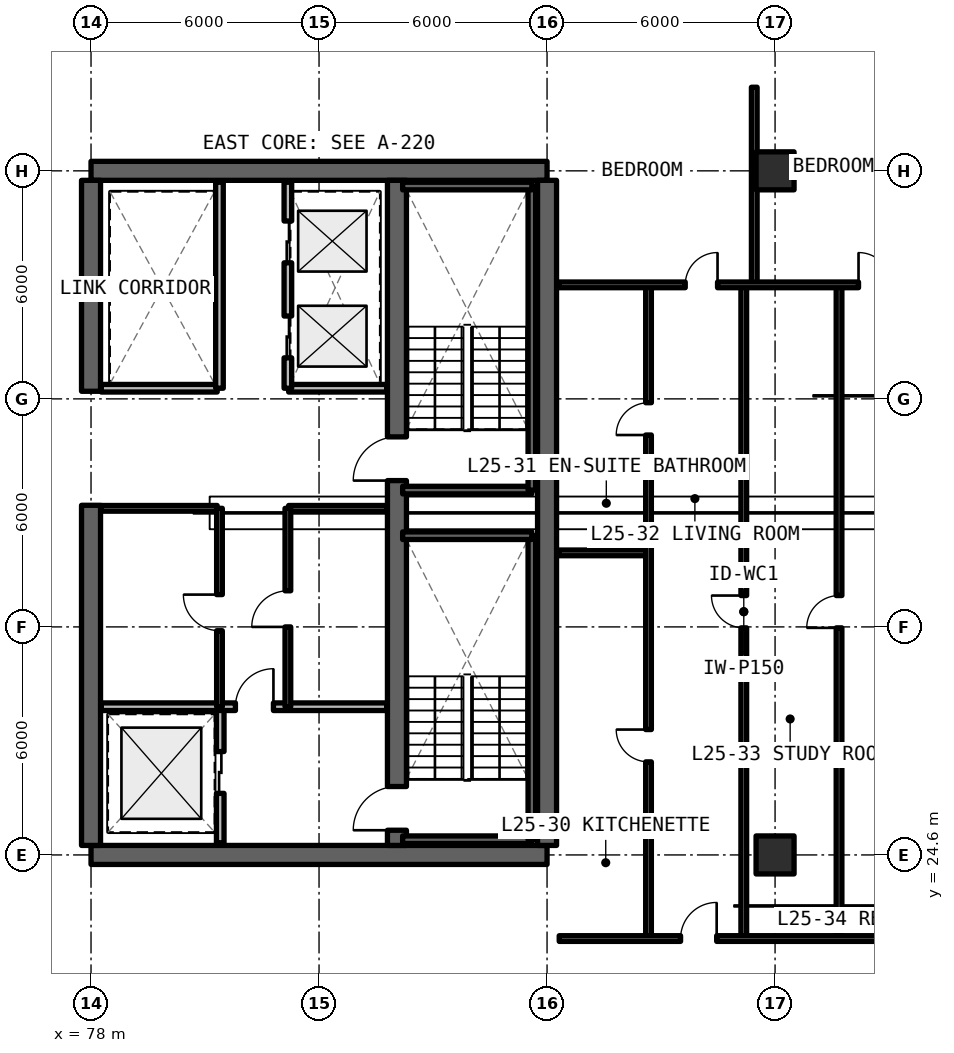
"""IFC4 building model, lengths in metres.
Left out: names, types, materials, properties, quantities, classifications, styles, units other than length and angle.
Written with IfcOpenShell. Run it as: python <this file> out.ifc"""

import sys

from ifc_helpers import new_model, si_unit, direction, frame, frame_2d, origin, origin_2d, place, context, subcontext, project, spatial, rectangle, extrude, element, fill, save


model = new_model("IFC4")
c1 = context("Model", 3, precision=1e-05, world=origin(), true_north=direction((0.0, 1.0)))
c2 = subcontext(c1, "Body", "Model", "MODEL_VIEW")
j1 = project(units=[si_unit("LENGTHUNIT", "METRE"), si_unit("PLANEANGLEUNIT", "RADIAN")], contexts=[c1])
p1 = place(None, origin())
s1 = spatial("IfcSite", under=j1, at=p1, CompositionType="ELEMENT")
p2 = place(p1, origin())
s2 = spatial("IfcBuilding", under=s1, at=p2, CompositionType="ELEMENT")
p3 = place(p2, frame((0.0, 0.0, 92.07)))
s3 = spatial("IfcBuildingStorey", under=s2, at=p3, CompositionType="ELEMENT", Elevation=92.07)
for number, where, z_axis, x_axis in (
    (1, (78.0, 24.6, 0.0), (0.0, 0.0, 1.0), (1.0, 0.0, 0.0)),
    (2, (90.0, 42.6, 0.0), (0.0, 0.0, 1.0), (-1.0, 0.0, 0.0)),
):
    element("IfcWall", number, at=place(p3, frame(where, z_axis=z_axis, x_axis=x_axis)), inside=s3, PredefinedType="SHEAR", context=c2, shape_type="SweptSolid", body=[
        extrude(rectangle(XDim=12.0, YDim=0.5, at=frame_2d((6.0, 0.0))), origin(), (0.0, 0.0, 1.0), 3.3),
    ])
p4 = place(p3, frame((90.0, 24.85, 0.0), z_axis=(0.0, 0.0, 1.0), x_axis=(0.0, 1.0, 0.0)))
e3 = element("IfcWall", 3, at=p4, inside=s3, PredefinedType="SHEAR", context=c2, shape_type="SweptSolid", body=[
    extrude(rectangle(XDim=17.5, YDim=0.5, at=frame_2d((8.75, 0.0))), origin(), (0.0, 0.0, 1.0), 3.3),
])
p5 = place(p3, frame((78.0, 24.85, 0.0), z_axis=(0.0, 0.0, 1.0), x_axis=(0.0, 1.0, 0.0)))
e4 = element("IfcWall", 4, at=p5, inside=s3, PredefinedType="SHEAR", context=c2, shape_type="SweptSolid", body=[
    extrude(rectangle(XDim=8.95, YDim=0.5, at=frame_2d((4.475, 0.0))), origin(), (0.0, 0.0, 1.0), 3.3),
])
p6 = place(p3, frame((78.0, 36.8, 0.0), z_axis=(0.0, 0.0, 1.0), x_axis=(0.0, 1.0, 0.0)))
e5 = element("IfcWall", 5, at=p6, inside=s3, PredefinedType="SHEAR", context=c2, shape_type="SweptSolid", body=[
    extrude(rectangle(XDim=5.55, YDim=0.5, at=frame_2d((2.775, 0.0))), origin(), (0.0, 0.0, 1.0), 3.3),
])
p7 = place(p3, frame((86.05, 24.85, 0.0), z_axis=(0.0, 0.0, 1.0), x_axis=(0.0, 1.0, 0.0)))
e6 = element("IfcWall", 6, at=p7, inside=s3, PredefinedType="SHEAR", context=c2, shape_type="SweptSolid", body=[
    extrude(rectangle(XDim=17.5, YDim=0.5, at=frame_2d((8.75, 0.0))), origin(), (0.0, 0.0, 1.0), 3.3),
])
p8 = place(p7, frame((0.4, 0.0, 0.0)))
e7 = element("IfcOpeningElement", 7, at=p8, cuts=e6, PredefinedType="OPENING", context=c2, shape_type="SweptSolid", body=[
    extrude(rectangle(XDim=1.15, YDim=2.15, at=frame_2d((0.575, 1.075))), frame((0.0, 0.26, 0.0), z_axis=(0.0, -1.0, 0.0), x_axis=(1.0, 0.0, 0.0)), (0.0, 0.0, 1.0), 0.52),
])
p9 = place(p7, frame((9.6, 0.0, 0.0)))
e8 = element("IfcOpeningElement", 8, at=p9, cuts=e6, PredefinedType="OPENING", context=c2, shape_type="SweptSolid", body=[
    extrude(rectangle(XDim=1.15, YDim=2.15, at=frame_2d((0.575, 1.075))), frame((0.0, 0.26, 0.0), z_axis=(0.0, -1.0, 0.0), x_axis=(1.0, 0.0, 0.0)), (0.0, 0.0, 1.0), 0.52),
])
for number, where, z_axis, x_axis in (
    (9, (96.0, 24.6, 0.0), (0.0, 0.0, 1.0), (1.0, 0.0, 0.0)),
    (10, (96.0, 42.6, 0.0), (0.0, 0.0, 1.0), (1.0, 0.0, 0.0)),
):
    element("IfcColumn", number, at=place(p3, frame(where, z_axis=z_axis, x_axis=x_axis)), inside=s3, PredefinedType="COLUMN", context=c2, shape_type="SweptSolid", body=[
        extrude(rectangle(XDim=1.0, YDim=1.0, at=origin_2d()), origin(), (0.0, 0.0, 1.0), 3.3),
    ])
p10 = place(p3, frame((81.4, 24.92, 0.0), z_axis=(0.0, 0.0, 1.0), x_axis=(0.0, 1.0, 0.0)))
e11 = element("IfcWall", 11, at=p10, inside=s3, PredefinedType="SOLIDWALL", context=c2, shape_type="SweptSolid", body=[
    extrude(rectangle(XDim=3.58, YDim=0.2, at=frame_2d((1.79, 0.0))), origin(), (0.0, 0.0, 1.0), 2.35),
])
p11 = place(p10, frame((1.3, 0.0, 0.0)))
e12 = element("IfcOpeningElement", 12, at=p11, cuts=e11, PredefinedType="OPENING", context=c2, shape_type="SweptSolid", body=[
    extrude(rectangle(XDim=1.1, YDim=2.2, at=frame_2d((0.55, 1.1))), frame((0.0, 0.11, 0.0), z_axis=(0.0, -1.0, 0.0), x_axis=(1.0, 0.0, 0.0)), (0.0, 0.0, 1.0), 0.22),
])
p12 = place(p3, frame((78.27, 28.5, 0.0), z_axis=(0.0, 0.0, 1.0), x_axis=(1.0, 0.0, 0.0)))
e13 = element("IfcWall", 13, at=p12, inside=s3, PredefinedType="SOLIDWALL", context=c2, shape_type="SweptSolid", body=[
    extrude(rectangle(XDim=7.51, YDim=0.2, at=frame_2d((3.755, 0.0))), origin(), (0.0, 0.0, 1.0), 2.35),
])
p13 = place(p12, frame((3.53, 0.0, 0.0)))
e14 = element("IfcOpeningElement", 14, at=p13, cuts=e13, PredefinedType="OPENING", context=c2, shape_type="SweptSolid", body=[
    extrude(rectangle(XDim=1.0, YDim=2.15, at=frame_2d((0.5, 1.075))), frame((0.0, 0.11, 0.0), z_axis=(0.0, -1.0, 0.0), x_axis=(1.0, 0.0, 0.0)), (0.0, 0.0, 1.0), 0.22),
])
p14 = place(p3, frame((83.2, 33.72, 0.0), z_axis=(0.0, 0.0, 1.0), x_axis=(1.0, 0.0, 0.0)))
e15 = element("IfcWall", 15, at=p14, inside=s3, PredefinedType="SOLIDWALL", context=c2, shape_type="SweptSolid", body=[
    extrude(rectangle(XDim=2.58, YDim=0.15, at=frame_2d((1.29, 0.0))), origin(), (0.0, 0.0, 1.0), 2.35),
])
p15 = place(p3, frame((83.18, 28.5, 0.0), z_axis=(0.0, 0.0, 1.0), x_axis=(0.0, 1.0, 0.0)))
e16 = element("IfcWall", 16, at=p15, inside=s3, PredefinedType="SOLIDWALL", context=c2, shape_type="SweptSolid", body=[
    extrude(rectangle(XDim=5.22, YDim=0.15, at=frame_2d((2.61, 0.0))), origin(), (0.0, 0.0, 1.0), 2.35),
])
p16 = place(p15, frame((2.1, 0.0, 0.0)))
e17 = element("IfcOpeningElement", 17, at=p16, cuts=e16, PredefinedType="OPENING", context=c2, shape_type="SweptSolid", body=[
    extrude(rectangle(XDim=0.95, YDim=2.15, at=frame_2d((0.475, 1.075))), frame((0.0, 0.085, 0.0), z_axis=(0.0, -1.0, 0.0), x_axis=(1.0, 0.0, 0.0)), (0.0, 0.0, 1.0), 0.17),
])
p17 = place(p3, frame((78.27, 33.72, 0.0), z_axis=(0.0, 0.0, 1.0), x_axis=(1.0, 0.0, 0.0)))
e18 = element("IfcWall", 18, at=p17, inside=s3, PredefinedType="SOLIDWALL", context=c2, shape_type="SweptSolid", body=[
    extrude(rectangle(XDim=3.05, YDim=0.15, at=frame_2d((1.525, 0.0))), origin(), (0.0, 0.0, 1.0), 2.35),
])
p18 = place(p3, frame((81.38, 28.5, 0.0), z_axis=(0.0, 0.0, 1.0), x_axis=(0.0, 1.0, 0.0)))
e19 = element("IfcWall", 19, at=p18, inside=s3, PredefinedType="SOLIDWALL", context=c2, shape_type="SweptSolid", body=[
    extrude(rectangle(XDim=5.22, YDim=0.15, at=frame_2d((2.61, 0.0))), origin(), (0.0, 0.0, 1.0), 2.35),
])
p19 = place(p18, frame((2.0, 0.0, 0.0)))
e20 = element("IfcOpeningElement", 20, at=p19, cuts=e19, PredefinedType="OPENING", context=c2, shape_type="SweptSolid", body=[
    extrude(rectangle(XDim=0.95, YDim=2.15, at=frame_2d((0.475, 1.075))), frame((0.0, 0.085, 0.0), z_axis=(0.0, -1.0, 0.0), x_axis=(1.0, 0.0, 0.0)), (0.0, 0.0, 1.0), 0.17),
])
p20 = place(p3, frame((83.2, 36.88, 0.0), z_axis=(0.0, 0.0, 1.0), x_axis=(1.0, 0.0, 0.0)))
e21 = element("IfcWall", 21, at=p20, inside=s3, PredefinedType="SOLIDWALL", context=c2, shape_type="SweptSolid", body=[
    extrude(rectangle(XDim=2.58, YDim=0.2, at=frame_2d((1.29, 0.0))), origin(), (0.0, 0.0, 1.0), 2.35),
])
p21 = place(p3, frame((83.18, 36.88, 0.0), z_axis=(0.0, 0.0, 1.0), x_axis=(0.0, 1.0, 0.0)))
e22 = element("IfcWall", 22, at=p21, inside=s3, PredefinedType="SOLIDWALL", context=c2, shape_type="SweptSolid", body=[
    extrude(rectangle(XDim=5.42, YDim=0.2, at=frame_2d((2.71, 0.0))), origin(), (0.0, 0.0, 1.0), 2.35),
])
p22 = place(p21, frame((0.8, 0.0, 0.0)))
e23 = element("IfcOpeningElement", 23, at=p22, cuts=e22, PredefinedType="OPENING", context=c2, shape_type="SweptSolid", body=[
    extrude(rectangle(XDim=1.1, YDim=2.2, at=frame_2d((0.55, 1.1))), frame((0.0, 0.11, 0.0), z_axis=(0.0, -1.0, 0.0), x_axis=(1.0, 0.0, 0.0)), (0.0, 0.0, 1.0), 0.22),
])
p23 = place(p21, frame((3.3, 0.0, 0.0)))
e24 = element("IfcOpeningElement", 24, at=p23, cuts=e22, PredefinedType="OPENING", context=c2, shape_type="SweptSolid", body=[
    extrude(rectangle(XDim=1.1, YDim=2.2, at=frame_2d((0.55, 1.1))), frame((0.0, 0.11, 0.0), z_axis=(0.0, -1.0, 0.0), x_axis=(1.0, 0.0, 0.0)), (0.0, 0.0, 1.0), 0.22),
])
p24 = place(p3, frame((78.27, 36.88, 0.0), z_axis=(0.0, 0.0, 1.0), x_axis=(1.0, 0.0, 0.0)))
e25 = element("IfcWall", 25, at=p24, inside=s3, PredefinedType="SOLIDWALL", context=c2, shape_type="SweptSolid", body=[
    extrude(rectangle(XDim=3.05, YDim=0.2, at=frame_2d((1.525, 0.0))), origin(), (0.0, 0.0, 1.0), 2.35),
])
p25 = place(p3, frame((81.38, 36.88, 0.0), z_axis=(0.0, 0.0, 1.0), x_axis=(0.0, 1.0, 0.0)))
e26 = element("IfcWall", 26, at=p25, inside=s3, PredefinedType="SOLIDWALL", context=c2, shape_type="SweptSolid", body=[
    extrude(rectangle(XDim=5.42, YDim=0.2, at=frame_2d((2.71, 0.0))), origin(), (0.0, 0.0, 1.0), 2.35),
])
p26 = place(p3, frame((95.177, 22.4, 0.0), z_axis=(0.0, 0.0, 1.0), x_axis=(0.0, 1.0, 0.0)))
e27 = element("IfcWall", 27, at=p26, inside=s3, PredefinedType="PARTITIONING", context=c2, shape_type="SweptSolid", body=[
    extrude(rectangle(XDim=17.2, YDim=0.15, at=frame_2d((8.6, 0.0))), origin(), (0.0, 0.0, 1.0), 2.35),
])
p27 = place(p26, frame((8.175, 0.0, 0.0)))
e28 = element("IfcOpeningElement", 28, at=p27, cuts=e27, PredefinedType="OPENING", context=c2, shape_type="SweptSolid", body=[
    extrude(rectangle(XDim=0.85, YDim=2.1, at=frame_2d((0.425, 1.05))), frame((0.0, 0.085, 0.0), z_axis=(0.0, -1.0, 0.0), x_axis=(1.0, 0.0, 0.0)), (0.0, 0.0, 1.0), 0.17),
])
p28 = place(p3, frame((97.683, 22.4, 0.0), z_axis=(0.0, 0.0, 1.0), x_axis=(0.0, 1.0, 0.0)))
e29 = element("IfcWall", 29, at=p28, inside=s3, PredefinedType="PARTITIONING", context=c2, shape_type="SweptSolid", body=[
    extrude(rectangle(XDim=17.2, YDim=0.15, at=frame_2d((8.6, 0.0))), origin(), (0.0, 0.0, 1.0), 2.35),
])
p29 = place(p28, frame((8.175, 0.0, 0.0)))
e30 = element("IfcOpeningElement", 30, at=p29, cuts=e29, PredefinedType="OPENING", context=c2, shape_type="SweptSolid", body=[
    extrude(rectangle(XDim=0.85, YDim=2.1, at=frame_2d((0.425, 1.05))), frame((0.0, 0.085, 0.0), z_axis=(0.0, -1.0, 0.0), x_axis=(1.0, 0.0, 0.0)), (0.0, 0.0, 1.0), 0.17),
])
p30 = place(p3, frame((90.32, 32.548, 0.0), z_axis=(0.0, 0.0, 1.0), x_axis=(1.0, 0.0, 0.0)))
e31 = element("IfcWall", 31, at=p30, inside=s3, PredefinedType="PARTITIONING", context=c2, shape_type="SweptSolid", body=[
    extrude(rectangle(XDim=2.35, YDim=0.15, at=frame_2d((1.175, 0.0))), origin(), (0.0, 0.0, 1.0), 2.35),
])
p31 = place(p3, frame((92.67, 22.4, 0.0), z_axis=(0.0, 0.0, 1.0), x_axis=(0.0, 1.0, 0.0)))
e32 = element("IfcWall", 32, at=p31, inside=s3, PredefinedType="PARTITIONING", context=c2, shape_type="SweptSolid", body=[
    extrude(rectangle(XDim=17.2, YDim=0.15, at=frame_2d((8.6, 0.0))), origin(), (0.0, 0.0, 1.0), 2.35),
])
p32 = place(p31, frame((4.649, 0.0, 0.0)))
e33 = element("IfcOpeningElement", 33, at=p32, cuts=e32, PredefinedType="OPENING", context=c2, shape_type="SweptSolid", body=[
    extrude(rectangle(XDim=0.85, YDim=2.1, at=frame_2d((0.425, 1.05))), frame((0.0, 0.085, 0.0), z_axis=(0.0, -1.0, 0.0), x_axis=(1.0, 0.0, 0.0)), (0.0, 0.0, 1.0), 0.17),
])
p33 = place(p31, frame((13.249, 0.0, 0.0)))
e34 = element("IfcOpeningElement", 34, at=p33, cuts=e32, PredefinedType="OPENING", context=c2, shape_type="SweptSolid", body=[
    extrude(rectangle(XDim=0.85, YDim=2.1, at=frame_2d((0.425, 1.05))), frame((0.0, 0.085, 0.0), z_axis=(0.0, -1.0, 0.0), x_axis=(1.0, 0.0, 0.0)), (0.0, 0.0, 1.0), 0.17),
])
p34 = place(p3, frame((95.452, 39.6, 0.0), z_axis=(0.0, 0.0, 1.0), x_axis=(0.0, 1.0, 0.0)))
e35 = element("IfcWall", 35, at=p34, inside=s3, PredefinedType="PARTITIONING", context=c2, shape_type="SweptSolid", body=[
    extrude(rectangle(XDim=5.2, YDim=0.15, at=frame_2d((2.6, 0.0))), origin(), (0.0, 0.0, 1.0), 2.35),
])
p35 = place(p3, frame((90.32, 39.6, 0.0), z_axis=(0.0, 0.0, 1.0), x_axis=(1.0, 0.0, 0.0)))
e36 = element("IfcWall", 36, at=p35, inside=s3, PredefinedType="PARTITIONING", context=c2, shape_type="SweptSolid", body=[
    extrude(rectangle(XDim=9.87, YDim=0.15, at=frame_2d((4.935, 0.0))), origin(), (0.0, 0.0, 1.0), 2.35),
])
p36 = place(p35, frame((3.316, 0.0, 0.0)))
e37 = element("IfcOpeningElement", 37, at=p36, cuts=e36, PredefinedType="OPENING", context=c2, shape_type="SweptSolid", body=[
    extrude(rectangle(XDim=0.85, YDim=2.1, at=frame_2d((0.425, 1.05))), frame((0.0, 0.085, 0.0), z_axis=(0.0, -1.0, 0.0), x_axis=(1.0, 0.0, 0.0)), (0.0, 0.0, 1.0), 0.17),
])
p37 = place(p35, frame((7.876, 0.0, 0.0)))
e38 = element("IfcOpeningElement", 38, at=p37, cuts=e36, PredefinedType="OPENING", context=c2, shape_type="SweptSolid", body=[
    extrude(rectangle(XDim=0.85, YDim=2.1, at=frame_2d((0.425, 1.05))), frame((0.0, 0.085, 0.0), z_axis=(0.0, -1.0, 0.0), x_axis=(1.0, 0.0, 0.0)), (0.0, 0.0, 1.0), 0.17),
])
p38 = place(p3, frame((90.32, 22.4, 0.0), z_axis=(0.0, 0.0, 1.0), x_axis=(1.0, 0.0, 0.0)))
e39 = element("IfcWall", 39, at=p38, inside=s3, PredefinedType="SOLIDWALL", context=c2, shape_type="SweptSolid", body=[
    extrude(rectangle(XDim=9.87, YDim=0.15, at=frame_2d((4.935, 0.0))), origin(), (0.0, 0.0, 1.0), 2.35),
])
p39 = place(p38, frame((3.193, 0.0, 0.0)))
e40 = element("IfcOpeningElement", 40, at=p39, cuts=e39, PredefinedType="OPENING", context=c2, shape_type="SweptSolid", body=[
    extrude(rectangle(XDim=0.95, YDim=2.15, at=frame_2d((0.475, 1.075))), frame((0.0, 0.085, 0.0), z_axis=(0.0, -1.0, 0.0), x_axis=(1.0, 0.0, 0.0)), (0.0, 0.0, 1.0), 0.17),
])
p40 = place(p3, frame((86.2, 25.0, 0.0), z_axis=(0.0, 0.0, 1.0), x_axis=(1.0, 0.0, 0.0)))
e41 = element("IfcWall", 41, at=p40, inside=s3, PredefinedType="SOLIDWALL", context=c2, shape_type="SweptSolid", body=[
    extrude(rectangle(XDim=3.4, YDim=0.2, at=frame_2d((1.7, 0.0))), origin(), (0.0, 0.0, 1.0), 3.3),
])
p41 = place(p3, frame((89.6, 25.0, 0.0), z_axis=(0.0, 0.0, 1.0), x_axis=(0.0, 1.0, 0.0)))
e42 = element("IfcWall", 42, at=p41, inside=s3, PredefinedType="SOLIDWALL", context=c2, shape_type="SweptSolid", body=[
    extrude(rectangle(XDim=8.0, YDim=0.2, at=frame_2d((4.0, 0.0))), origin(), (0.0, 0.0, 1.0), 3.3),
])
for number, where, z_axis, x_axis in (
    (43, (89.6, 33.0, 0.0), (0.0, 0.0, 1.0), (-1.0, 0.0, 0.0)),
    (44, (86.2, 34.2, 0.0), (0.0, 0.0, 1.0), (1.0, 0.0, 0.0)),
):
    element("IfcWall", number, at=place(p3, frame(where, z_axis=z_axis, x_axis=x_axis)), inside=s3, PredefinedType="SOLIDWALL", context=c2, shape_type="SweptSolid", body=[
        extrude(rectangle(XDim=3.4, YDim=0.2, at=frame_2d((1.7, 0.0))), origin(), (0.0, 0.0, 1.0), 3.3),
    ])
p42 = place(p3, frame((89.6, 34.2, 0.0), z_axis=(0.0, 0.0, 1.0), x_axis=(0.0, 1.0, 0.0)))
e45 = element("IfcWall", 45, at=p42, inside=s3, PredefinedType="SOLIDWALL", context=c2, shape_type="SweptSolid", body=[
    extrude(rectangle(XDim=8.0, YDim=0.2, at=frame_2d((4.0, 0.0))), origin(), (0.0, 0.0, 1.0), 3.3),
])
p43 = place(p3, frame((89.6, 42.2, 0.0), z_axis=(0.0, 0.0, 1.0), x_axis=(-1.0, 0.0, 0.0)))
e46 = element("IfcWall", 46, at=p43, inside=s3, PredefinedType="SOLIDWALL", context=c2, shape_type="SweptSolid", body=[
    extrude(rectangle(XDim=3.4, YDim=0.2, at=frame_2d((1.7, 0.0))), origin(), (0.0, 0.0, 1.0), 3.3),
])
p44 = place(p11, origin())
e47 = element("IfcDoor", 47, at=p44, inside=s3, OperationType="SLIDING_TO_LEFT", PredefinedType="DOOR", context=c2, shape_type="SweptSolid", body=[
    extrude(rectangle(XDim=1.1, YDim=2.2, at=frame_2d((0.55, 1.1))), frame((0.0, 0.025, 0.0), z_axis=(0.0, -1.0, 0.0), x_axis=(1.0, 0.0, 0.0)), (0.0, 0.0, 1.0), 0.05),
])
fill(e12, e47)
p45 = place(p13, origin())
e48 = element("IfcDoor", 48, at=p45, inside=s3, OperationType="SINGLE_SWING_RIGHT", PredefinedType="DOOR", context=c2, shape_type="SweptSolid", body=[
    extrude(rectangle(XDim=1.0, YDim=2.15, at=frame_2d((0.5, 1.075))), frame((0.0, 0.025, 0.0), z_axis=(0.0, -1.0, 0.0), x_axis=(1.0, 0.0, 0.0)), (0.0, 0.0, 1.0), 0.05),
])
fill(e14, e48)
p46 = place(p16, origin())
e49 = element("IfcDoor", 49, at=p46, inside=s3, OperationType="SINGLE_SWING_LEFT", PredefinedType="DOOR", context=c2, shape_type="SweptSolid", body=[
    extrude(rectangle(XDim=0.95, YDim=2.15, at=frame_2d((0.475, 1.075))), frame((0.0, 0.025, 0.0), z_axis=(0.0, -1.0, 0.0), x_axis=(1.0, 0.0, 0.0)), (0.0, 0.0, 1.0), 0.05),
])
fill(e17, e49)
p47 = place(p19, origin())
e50 = element("IfcDoor", 50, at=p47, inside=s3, OperationType="SINGLE_SWING_RIGHT", PredefinedType="DOOR", context=c2, shape_type="SweptSolid", body=[
    extrude(rectangle(XDim=0.95, YDim=2.15, at=frame_2d((0.475, 1.075))), frame((0.0, 0.025, 0.0), z_axis=(0.0, -1.0, 0.0), x_axis=(1.0, 0.0, 0.0)), (0.0, 0.0, 1.0), 0.05),
])
fill(e20, e50)
p48 = place(p22, origin())
e51 = element("IfcDoor", 51, at=p48, inside=s3, OperationType="SLIDING_TO_LEFT", PredefinedType="DOOR", context=c2, shape_type="SweptSolid", body=[
    extrude(rectangle(XDim=1.1, YDim=2.2, at=frame_2d((0.55, 1.1))), frame((0.0, 0.025, 0.0), z_axis=(0.0, -1.0, 0.0), x_axis=(1.0, 0.0, 0.0)), (0.0, 0.0, 1.0), 0.05),
])
fill(e23, e51)
p49 = place(p23, origin())
e52 = element("IfcDoor", 52, at=p49, inside=s3, OperationType="SLIDING_TO_RIGHT", PredefinedType="DOOR", context=c2, shape_type="SweptSolid", body=[
    extrude(rectangle(XDim=1.1, YDim=2.2, at=frame_2d((0.55, 1.1))), frame((0.0, 0.025, 0.0), z_axis=(0.0, -1.0, 0.0), x_axis=(1.0, 0.0, 0.0)), (0.0, 0.0, 1.0), 0.05),
])
fill(e24, e52)
p50 = place(p27, origin())
e53 = element("IfcDoor", 53, at=p50, inside=s3, OperationType="SINGLE_SWING_RIGHT", PredefinedType="DOOR", context=c2, shape_type="SweptSolid", body=[
    extrude(rectangle(XDim=0.85, YDim=2.1, at=frame_2d((0.425, 1.05))), frame((0.0, 0.025, 0.0), z_axis=(0.0, -1.0, 0.0), x_axis=(1.0, 0.0, 0.0)), (0.0, 0.0, 1.0), 0.05),
])
fill(e28, e53)
p51 = place(p29, origin())
e54 = element("IfcDoor", 54, at=p51, inside=s3, OperationType="SINGLE_SWING_LEFT", PredefinedType="DOOR", context=c2, shape_type="SweptSolid", body=[
    extrude(rectangle(XDim=0.85, YDim=2.1, at=frame_2d((0.425, 1.05))), frame((0.0, 0.025, 0.0), z_axis=(0.0, -1.0, 0.0), x_axis=(1.0, 0.0, 0.0)), (0.0, 0.0, 1.0), 0.05),
])
fill(e30, e54)
p52 = place(p32, origin())
e55 = element("IfcDoor", 55, at=p52, inside=s3, OperationType="SINGLE_SWING_RIGHT", PredefinedType="DOOR", context=c2, shape_type="SweptSolid", body=[
    extrude(rectangle(XDim=0.85, YDim=2.1, at=frame_2d((0.425, 1.05))), frame((0.0, 0.025, 0.0), z_axis=(0.0, -1.0, 0.0), x_axis=(1.0, 0.0, 0.0)), (0.0, 0.0, 1.0), 0.05),
])
fill(e33, e55)
p53 = place(p33, origin())
e56 = element("IfcDoor", 56, at=p53, inside=s3, OperationType="SINGLE_SWING_LEFT", PredefinedType="DOOR", context=c2, shape_type="SweptSolid", body=[
    extrude(rectangle(XDim=0.85, YDim=2.1, at=frame_2d((0.425, 1.05))), frame((0.0, 0.025, 0.0), z_axis=(0.0, -1.0, 0.0), x_axis=(1.0, 0.0, 0.0)), (0.0, 0.0, 1.0), 0.05),
])
fill(e34, e56)
p54 = place(p36, origin())
e57 = element("IfcDoor", 57, at=p54, inside=s3, OperationType="SINGLE_SWING_RIGHT", PredefinedType="DOOR", context=c2, shape_type="SweptSolid", body=[
    extrude(rectangle(XDim=0.85, YDim=2.1, at=frame_2d((0.425, 1.05))), frame((0.0, 0.025, 0.0), z_axis=(0.0, -1.0, 0.0), x_axis=(1.0, 0.0, 0.0)), (0.0, 0.0, 1.0), 0.05),
])
fill(e37, e57)
p55 = place(p37, origin())
e58 = element("IfcDoor", 58, at=p55, inside=s3, OperationType="SINGLE_SWING_LEFT", PredefinedType="DOOR", context=c2, shape_type="SweptSolid", body=[
    extrude(rectangle(XDim=0.85, YDim=2.1, at=frame_2d((0.425, 1.05))), frame((0.0, 0.025, 0.0), z_axis=(0.0, -1.0, 0.0), x_axis=(1.0, 0.0, 0.0)), (0.0, 0.0, 1.0), 0.05),
])
fill(e38, e58)
p56 = place(p39, origin())
e59 = element("IfcDoor", 59, at=p56, inside=s3, OperationType="SINGLE_SWING_RIGHT", PredefinedType="DOOR", context=c2, shape_type="SweptSolid", body=[
    extrude(rectangle(XDim=0.95, YDim=2.15, at=frame_2d((0.475, 1.075))), frame((0.0, 0.025, 0.0), z_axis=(0.0, -1.0, 0.0), x_axis=(1.0, 0.0, 0.0)), (0.0, 0.0, 1.0), 0.05),
])
fill(e40, e59)
p57 = place(p8, origin())
e60 = element("IfcDoor", 60, at=p57, inside=s3, OperationType="SINGLE_SWING_RIGHT", PredefinedType="DOOR", context=c2, shape_type="SweptSolid", body=[
    extrude(rectangle(XDim=1.15, YDim=2.15, at=frame_2d((0.575, 1.075))), frame((0.0, 0.025, 0.0), z_axis=(0.0, -1.0, 0.0), x_axis=(1.0, 0.0, 0.0)), (0.0, 0.0, 1.0), 0.05),
])
fill(e7, e60)
p58 = place(p9, origin())
e61 = element("IfcDoor", 61, at=p58, inside=s3, OperationType="SINGLE_SWING_LEFT", PredefinedType="DOOR", context=c2, shape_type="SweptSolid", body=[
    extrude(rectangle(XDim=1.15, YDim=2.15, at=frame_2d((0.575, 1.075))), frame((0.0, 0.025, 0.0), z_axis=(0.0, -1.0, 0.0), x_axis=(1.0, 0.0, 0.0)), (0.0, 0.0, 1.0), 0.05),
])
fill(e8, e61)
save(model, sys.argv[1])
